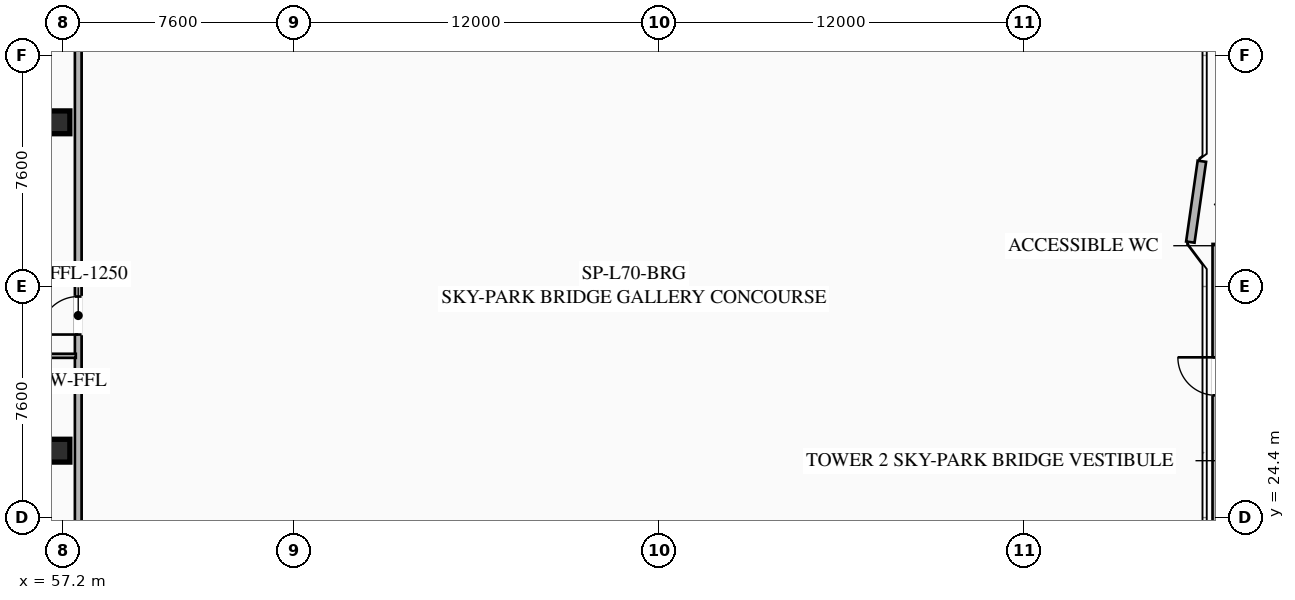
"""IFC4 building model, lengths in metres.
Left out: names, types, materials, properties, quantities, classifications, styles, units other than length and angle.
Written with IfcOpenShell. Run it as: python <this file> out.ifc"""

import sys

from ifc_helpers import new_model, si_unit, direction, frame, frame_2d, origin, origin_2d, place, context, subcontext, project, spatial, rectangle, hollow_rectangle, extrude, element, fill, save


model = new_model("IFC4")
c1 = context("Model", 3, precision=1e-05, world=origin(), true_north=direction((0.0, 1.0)))
c2 = subcontext(c1, "Body", "Model", "MODEL_VIEW")
j1 = project(units=[si_unit("LENGTHUNIT", "METRE"), si_unit("PLANEANGLEUNIT", "RADIAN")], contexts=[c1])
p1 = place(None, origin())
s1 = spatial("IfcSite", under=j1, at=p1, CompositionType="ELEMENT")
p2 = place(p1, origin())
s2 = spatial("IfcBuilding", under=s1, at=p2, CompositionType="ELEMENT")
p3 = place(p2, frame((0.0, 0.0, 259.4)))
s3 = spatial("IfcBuildingStorey", under=s2, at=p3, CompositionType="ELEMENT", Elevation=259.4)
for number, where, z_axis, x_axis in (
    (1, (57.05, 26.6, 0.0), (0.0, 0.0, 1.0), (1.0, 0.0, 0.0)),
    (2, (57.05, 37.4, 0.0), (0.0, 0.0, 1.0), (1.0, 0.0, 0.0)),
):
    element("IfcColumn", number, at=place(p3, frame(where, z_axis=z_axis, x_axis=x_axis)), inside=s3, PredefinedType="COLUMN", context=c2, shape_type="SweptSolid", body=[
        extrude(hollow_rectangle(XDim=0.75, YDim=0.75, WallThickness=0.032, at=origin_2d()), origin(), (0.0, 0.0, 1.0), 3.7),
    ])
p4 = place(p3, frame((94.28, 33.46, 0.0), z_axis=(0.0, 0.0, 1.0), x_axis=(0.141370477216, 0.989956760759, 0.0)))
e3 = element("IfcWall", 3, at=p4, inside=s3, PredefinedType="SOLIDWALL", context=c2, shape_type="SweptSolid", body=[
    extrude(rectangle(XDim=2.687, YDim=0.28, at=frame_2d((1.344, 0.0))), origin(), (0.0, 0.0, 1.0), 2.88),
])
p5 = place(p3, frame((57.7, 24.22, 0.0), z_axis=(0.0, 0.0, 1.0), x_axis=(0.0, 1.0, 0.0)))
e4 = element("IfcWall", 4, at=p5, inside=s3, PredefinedType="SOLIDWALL", context=c2, shape_type="SweptSolid", body=[
    extrude(rectangle(XDim=15.56, YDim=0.22, at=frame_2d((7.78, 0.0))), origin(), (0.0, 0.0, 1.0), 2.659),
])
p6 = place(p5, frame((6.2, 0.0, 0.0)))
e5 = element("IfcOpeningElement", 5, at=p6, cuts=e4, PredefinedType="OPENING", context=c2, shape_type="SweptSolid", body=[
    extrude(rectangle(XDim=1.25, YDim=2.25, at=frame_2d((0.625, 1.125))), frame((0.0, 0.12, 0.0), z_axis=(0.0, -1.0, 0.0), x_axis=(1.0, 0.0, 0.0)), (0.0, 0.0, 1.0), 0.24),
])
p7 = place(p3, frame((95.12, 24.22, 0.0), z_axis=(0.0, 0.0, 1.0), x_axis=(0.0, 1.0, 0.0)))
e6 = element("IfcWall", 6, at=p7, inside=s3, PredefinedType="SOLIDWALL", context=c2, shape_type="SweptSolid", body=[
    extrude(rectangle(XDim=9.18, YDim=0.22, at=frame_2d((4.59, 0.0))), origin(), (0.0, 0.0, 1.0), 2.659),
])
p8 = place(p7, frame((4.2, 0.0, 0.0)))
e7 = element("IfcOpeningElement", 7, at=p8, cuts=e6, PredefinedType="OPENING", context=c2, shape_type="SweptSolid", body=[
    extrude(rectangle(XDim=1.25, YDim=2.25, at=frame_2d((0.625, 1.125))), frame((0.0, 0.12, 0.0), z_axis=(0.0, -1.0, 0.0), x_axis=(1.0, 0.0, 0.0)), (0.0, 0.0, 1.0), 0.24),
])
for number, where, z_axis, x_axis in (
    (8, (51.43, 32.48, 0.0), (0.0, 0.0, 1.0), (1.0, 0.0, 0.0)),
    (9, (57.62, 29.72, 0.0), (0.0, 0.0, 1.0), (-1.0, 0.0, 0.0)),
):
    element("IfcWall", number, at=place(p3, frame(where, z_axis=z_axis, x_axis=x_axis)), inside=s3, PredefinedType="PARTITIONING", context=c2, shape_type="SweptSolid", body=[
        extrude(rectangle(XDim=6.19, YDim=0.135, at=frame_2d((3.095, 0.0))), origin(), (0.0, 0.0, 1.0), 2.659),
    ])
p9 = place(p6, origin())
e10 = element("IfcDoor", 10, at=p9, inside=s3, OperationType="SINGLE_SWING_LEFT", PredefinedType="DOOR", context=c2, shape_type="SweptSolid", body=[
    extrude(rectangle(XDim=1.25, YDim=2.25, at=frame_2d((0.625, 1.125))), frame((0.0, 0.025, 0.0), z_axis=(0.0, -1.0, 0.0), x_axis=(1.0, 0.0, 0.0)), (0.0, 0.0, 1.0), 0.05),
])
fill(e5, e10)
p10 = place(p8, origin())
e11 = element("IfcDoor", 11, at=p10, inside=s3, OperationType="SINGLE_SWING_RIGHT", PredefinedType="DOOR", context=c2, shape_type="SweptSolid", body=[
    extrude(rectangle(XDim=1.25, YDim=2.25, at=frame_2d((0.625, 1.125))), frame((0.0, 0.025, 0.0), z_axis=(0.0, -1.0, 0.0), x_axis=(1.0, 0.0, 0.0)), (0.0, 0.0, 1.0), 0.05),
])
fill(e7, e11)
save(model, sys.argv[1])
